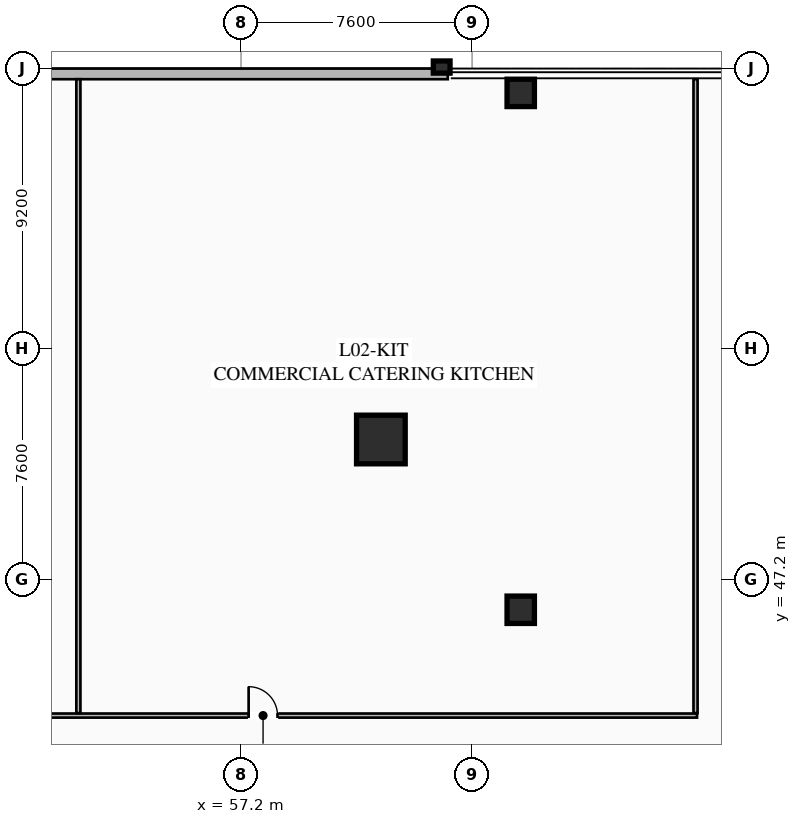
"""IFC4 building model, lengths in metres.
Left out: names, types, materials, properties, quantities, classifications, styles, units other than length and angle.
Written with IfcOpenShell. Run it as: python <this file> out.ifc"""

import sys

from ifc_helpers import new_model, si_unit, direction, frame, frame_2d, origin, origin_2d, place, context, subcontext, project, spatial, rectangle, hollow_rectangle, extrude, element, fill, save


model = new_model("IFC4")
c1 = context("Model", 3, precision=1e-05, world=origin(), true_north=direction((0.0, 1.0)))
c2 = subcontext(c1, "Body", "Model", "MODEL_VIEW")
j1 = project(units=[si_unit("LENGTHUNIT", "METRE"), si_unit("PLANEANGLEUNIT", "RADIAN")], contexts=[c1])
p1 = place(None, origin())
s1 = spatial("IfcSite", under=j1, at=p1, CompositionType="ELEMENT")
p2 = place(p1, origin())
s2 = spatial("IfcBuilding", under=s1, at=p2, CompositionType="ELEMENT")
p3 = place(p2, frame((0.0, 0.0, 10.2)))
s3 = spatial("IfcBuildingStorey", under=s2, at=p3, CompositionType="ELEMENT", Elevation=10.2)
p4 = place(p3, frame((61.8, 51.8, 0.0), z_axis=(0.0, 0.0, 1.0), x_axis=(1.0, 0.0, 0.0)))
e1 = element("IfcColumn", 1, at=p4, inside=s3, PredefinedType="COLUMN", context=c2, shape_type="SweptSolid", body=[
    extrude(hollow_rectangle(XDim=1.6, YDim=1.6, WallThickness=0.06, at=origin_2d()), origin(), (0.0, 0.0, 1.0), 5.14),
])
for number, where, z_axis, x_axis in (
    (2, (66.4, 63.2, 0.0), (0.0, 0.0, 1.0), (1.0, 0.0, 0.0)),
    (3, (66.4, 46.2, 0.0), (0.0, 0.0, 1.0), (1.0, 0.0, 0.0)),
):
    element("IfcColumn", number, at=place(p3, frame(where, z_axis=z_axis, x_axis=x_axis)), inside=s3, PredefinedType="COLUMN", context=c2, shape_type="SweptSolid", body=[
        extrude(rectangle(XDim=0.9, YDim=0.9, at=origin_2d()), origin(), (0.0, 0.0, 1.0), 5.14),
    ])
p5 = place(p3, frame((32.0, 63.825, 0.0), z_axis=(0.0, 0.0, 1.0), x_axis=(1.0, 0.0, 0.0)))
e4 = element("IfcWall", 4, at=p5, inside=s3, PredefinedType="SOLIDWALL", context=c2, shape_type="SweptSolid", body=[
    extrude(rectangle(XDim=32.0, YDim=0.35, at=frame_2d((16.0, 0.0))), origin(), (0.0, 0.0, 1.0), 5.14),
])
p6 = place(p5, frame((4.0, 0.0, 0.95)))
e5 = element("IfcOpeningElement", 5, at=p6, cuts=e4, PredefinedType="OPENING", context=c2, shape_type="SweptSolid", body=[
    extrude(rectangle(XDim=3.0, YDim=2.4, at=frame_2d((1.5, 1.2))), frame((0.0, 0.185, 0.0), z_axis=(0.0, -1.0, 0.0), x_axis=(1.0, 0.0, 0.0)), (0.0, 0.0, 1.0), 0.37),
])
p7 = place(p5, frame((15.4, 0.0, 0.95)))
e6 = element("IfcOpeningElement", 6, at=p7, cuts=e4, PredefinedType="OPENING", context=c2, shape_type="SweptSolid", body=[
    extrude(rectangle(XDim=3.0, YDim=2.4, at=frame_2d((1.5, 1.2))), frame((0.0, 0.185, 0.0), z_axis=(0.0, -1.0, 0.0), x_axis=(1.0, 0.0, 0.0)), (0.0, 0.0, 1.0), 0.37),
])
p8 = place(p3, frame((63.8, 64.05, 0.0), z_axis=(0.0, 0.0, 1.0), x_axis=(1.0, 0.0, 0.0)))
e7 = element("IfcColumn", 7, at=p8, inside=s3, PredefinedType="PILASTER", context=c2, shape_type="SweptSolid", body=[
    extrude(rectangle(XDim=0.55, YDim=0.4, at=origin_2d()), origin(), (0.0, 0.0, 1.0), 5.14),
])
p9 = place(p3, frame((21.45, 42.72, 0.0), z_axis=(0.0, 0.0, 1.0), x_axis=(1.0, 0.0, 0.0)))
e8 = element("IfcWall", 8, at=p9, inside=s3, PredefinedType="PARTITIONING", context=c2, shape_type="SweptSolid", body=[
    extrude(rectangle(XDim=50.75, YDim=0.135, at=frame_2d((25.375, 0.0))), origin(), (0.0, 0.0, 1.0), 2.71),
])
p10 = place(p9, frame((6.0, 0.0, 0.0)))
e9 = element("IfcOpeningElement", 9, at=p10, cuts=e8, PredefinedType="OPENING", context=c2, shape_type="SweptSolid", body=[
    extrude(rectangle(XDim=1.6, YDim=2.25, at=frame_2d((0.8, 1.125))), frame((0.0, 0.077, 0.0), z_axis=(0.0, -1.0, 0.0), x_axis=(1.0, 0.0, 0.0)), (0.0, 0.0, 1.0), 0.155),
])
p11 = place(p9, frame((36.0, 0.0, 0.0)))
e10 = element("IfcOpeningElement", 10, at=p11, cuts=e8, PredefinedType="OPENING", context=c2, shape_type="SweptSolid", body=[
    extrude(rectangle(XDim=0.95, YDim=2.05, at=frame_2d((0.475, 1.025))), frame((0.0, 0.077, 0.0), z_axis=(0.0, -1.0, 0.0), x_axis=(1.0, 0.0, 0.0)), (0.0, 0.0, 1.0), 0.155),
])
for number, where, z_axis, x_axis in (
    (11, (51.85, 42.8, 0.0), (0.0, 0.0, 1.0), (0.0, 1.0, 0.0)),
    (12, (72.15, 42.8, 0.0), (0.0, 0.0, 1.0), (0.0, 1.0, 0.0)),
):
    element("IfcWall", number, at=place(p3, frame(where, z_axis=z_axis, x_axis=x_axis)), inside=s3, PredefinedType="PARTITIONING", context=c2, shape_type="SweptSolid", body=[
        extrude(rectangle(XDim=20.85, YDim=0.135, at=frame_2d((10.425, 0.0))), origin(), (0.0, 0.0, 1.0), 2.71),
    ])
p12 = place(p11, origin())
e13 = element("IfcDoor", 13, at=p12, inside=s3, OperationType="SINGLE_SWING_LEFT", PredefinedType="DOOR", context=c2, shape_type="SweptSolid", body=[
    extrude(rectangle(XDim=0.95, YDim=2.05, at=frame_2d((0.475, 1.025))), frame((0.0, 0.025, 0.0), z_axis=(0.0, -1.0, 0.0), x_axis=(1.0, 0.0, 0.0)), (0.0, 0.0, 1.0), 0.05),
])
fill(e10, e13)
save(model, sys.argv[1])
